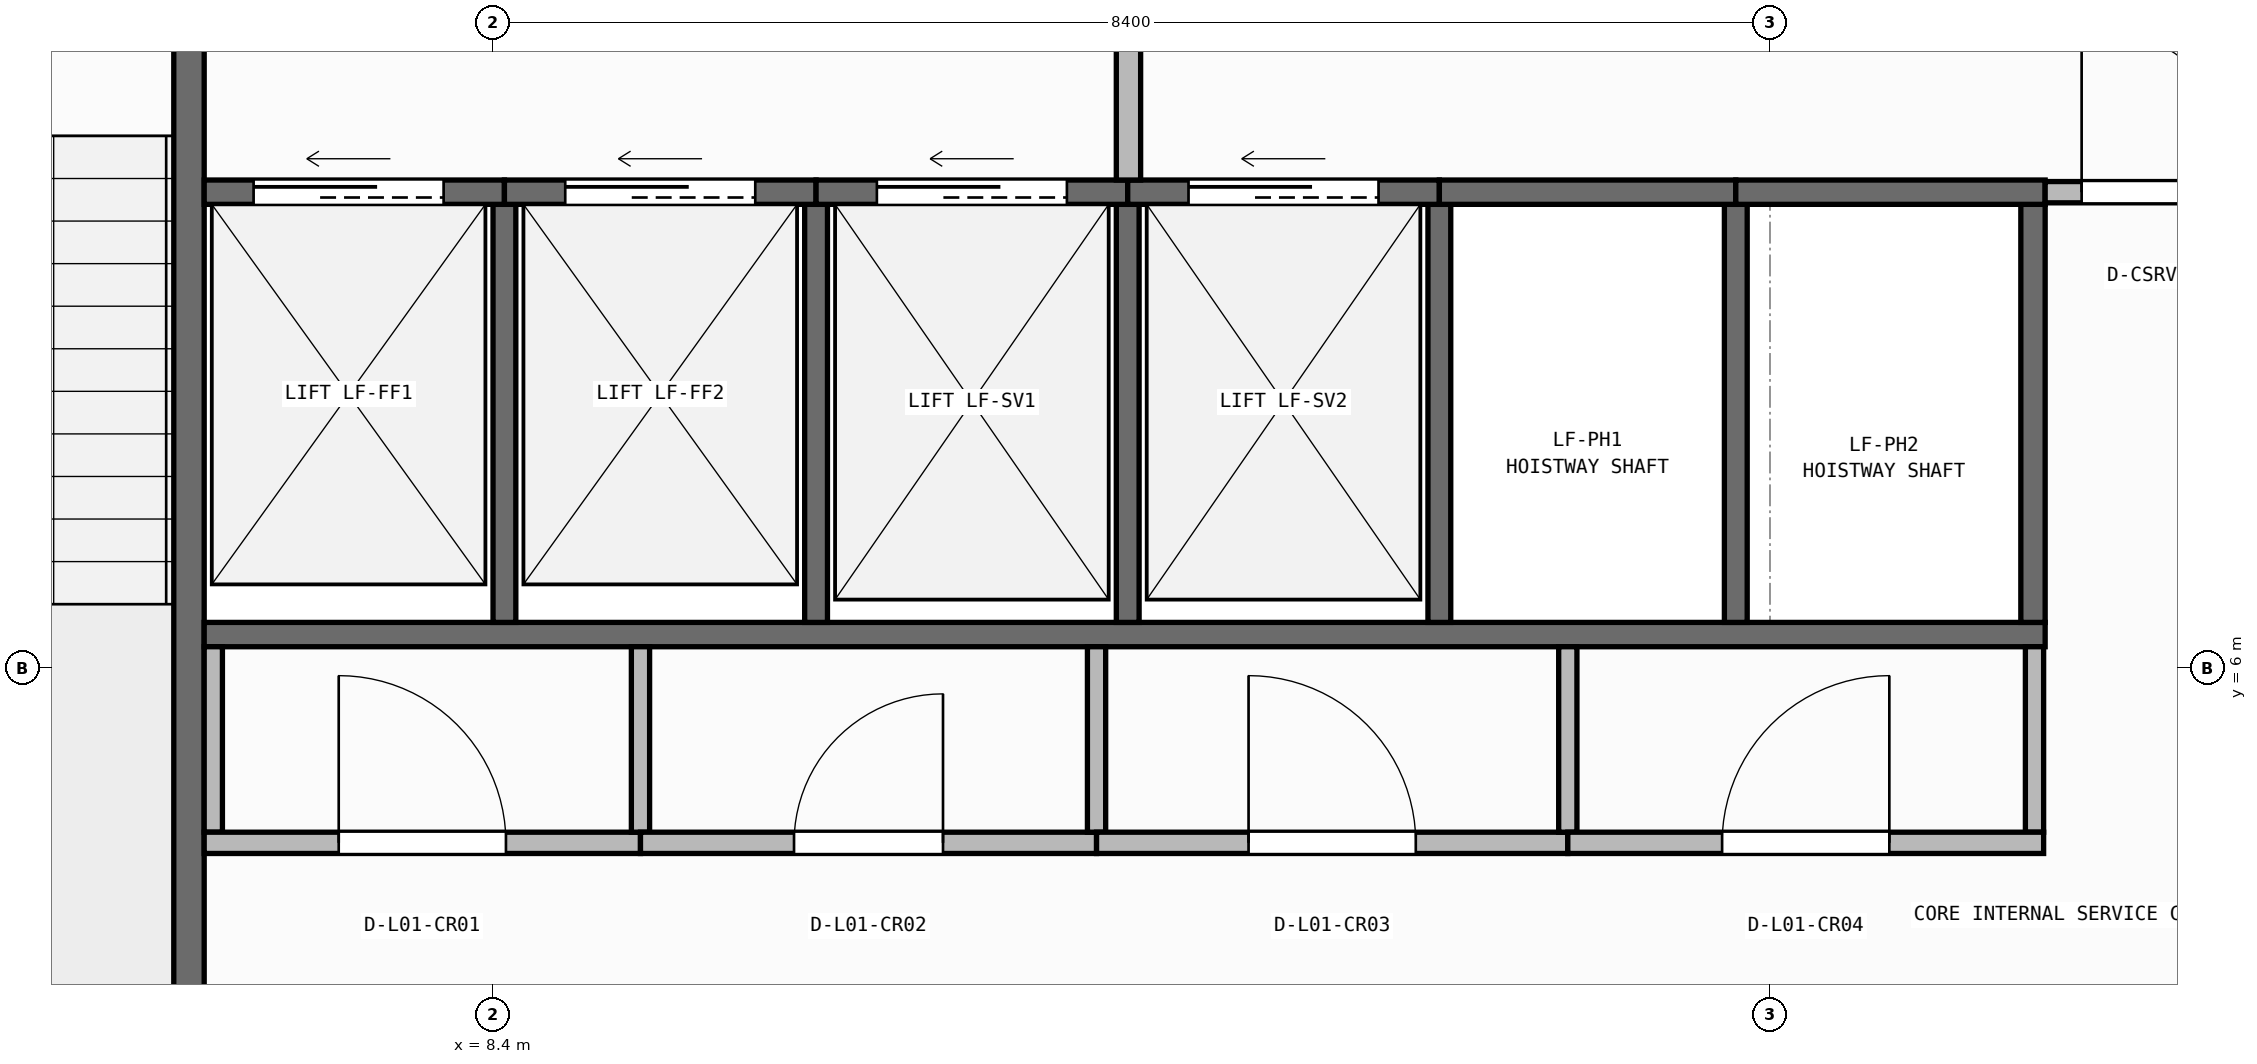
"""IFC4 building model, lengths in metres.
Left out: names, types, materials, properties, quantities, classifications, styles, units other than length and angle.
Written with IfcOpenShell. Run it as: python <this file> out.ifc"""

import sys

from ifc_helpers import new_model, si_unit, direction, frame, frame_2d, origin, place, context, subcontext, project, spatial, rectangle, extrude, element, fill, save


model = new_model("IFC4")
c1 = context("Model", 3, precision=1e-05, world=origin(), true_north=direction((0.0, 1.0)))
c2 = subcontext(c1, "Body", "Model", "MODEL_VIEW")
j1 = project(units=[si_unit("LENGTHUNIT", "METRE"), si_unit("PLANEANGLEUNIT", "RADIAN")], contexts=[c1])
p1 = place(None, origin())
s1 = spatial("IfcSite", under=j1, at=p1, CompositionType="ELEMENT")
p2 = place(p1, origin())
s2 = spatial("IfcBuilding", under=s1, at=p2, CompositionType="ELEMENT")
p3 = place(p2, frame((0.0, 0.0, 4.5)))
s3 = spatial("IfcBuildingStorey", under=s2, at=p3, CompositionType="ELEMENT", Elevation=4.5)
p4 = place(p3, frame((6.4, 3.5, 0.0), z_axis=(0.0, 0.0, 1.0), x_axis=(0.0, 1.0, 0.0)))
e1 = element("IfcWall", 1, at=p4, inside=s3, PredefinedType="SHEAR", context=c2, shape_type="SweptSolid", body=[
    extrude(rectangle(XDim=7.6, YDim=0.2, at=frame_2d((3.8, 0.0))), origin(), (0.0, 0.0, 1.0), 4.25),
])
p5 = place(p3, frame((6.5, 6.22, 0.0), z_axis=(0.0, 0.0, 1.0), x_axis=(1.0, 0.0, 0.0)))
e2 = element("IfcWall", 2, at=p5, inside=s3, PredefinedType="SHEAR", context=c2, shape_type="SweptSolid", body=[
    extrude(rectangle(XDim=12.11, YDim=0.16, at=frame_2d((6.055, 0.0))), origin(), (0.0, 0.0, 1.0), 4.25),
])
p6 = place(p3, frame((18.53, 6.3, 0.0), z_axis=(0.0, 0.0, 1.0), x_axis=(0.0, 1.0, 0.0)))
e3 = element("IfcWall", 3, at=p6, inside=s3, PredefinedType="SHEAR", context=c2, shape_type="SweptSolid", body=[
    extrude(rectangle(XDim=2.75, YDim=0.16, at=frame_2d((1.375, 0.0))), origin(), (0.0, 0.0, 1.0), 4.25),
])
for number, where, z_axis, x_axis in (
    (4, (8.475, 6.3, 0.0), (0.0, 0.0, 1.0), (0.0, 1.0, 0.0)),
    (5, (10.525, 6.3, 0.0), (0.0, 0.0, 1.0), (0.0, 1.0, 0.0)),
    (6, (12.575, 6.3, 0.0), (0.0, 0.0, 1.0), (0.0, 1.0, 0.0)),
    (7, (14.625, 6.3, 0.0), (0.0, 0.0, 1.0), (0.0, 1.0, 0.0)),
    (8, (16.575, 6.3, 0.0), (0.0, 0.0, 1.0), (0.0, 1.0, 0.0)),
):
    element("IfcWall", number, at=place(p3, frame(where, z_axis=z_axis, x_axis=x_axis)), inside=s3, PredefinedType="SHEAR", context=c2, shape_type="SweptSolid", body=[
        extrude(rectangle(XDim=2.75, YDim=0.15, at=frame_2d((1.375, 0.0))), origin(), (0.0, 0.0, 1.0), 4.25),
    ])
p7 = place(p3, frame((6.5, 9.13, 0.0), z_axis=(0.0, 0.0, 1.0), x_axis=(1.0, 0.0, 0.0)))
e9 = element("IfcWall", 9, at=p7, inside=s3, PredefinedType="SHEAR", context=c2, shape_type="SweptSolid", body=[
    extrude(rectangle(XDim=1.975, YDim=0.16, at=frame_2d((0.988, 0.0))), origin(), (0.0, 0.0, 1.0), 4.25),
])
p8 = place(p7, frame((0.325, 0.0, 0.0)))
e10 = element("IfcOpeningElement", 10, at=p8, cuts=e9, PredefinedType="OPENING", context=c2, shape_type="SweptSolid", body=[
    extrude(rectangle(XDim=1.25, YDim=2.15, at=frame_2d((0.625, 1.075))), frame((0.0, 0.09, 0.0), z_axis=(0.0, -1.0, 0.0), x_axis=(1.0, 0.0, 0.0)), (0.0, 0.0, 1.0), 0.18),
])
p9 = place(p3, frame((8.475, 9.13, 0.0), z_axis=(0.0, 0.0, 1.0), x_axis=(1.0, 0.0, 0.0)))
e11 = element("IfcWall", 11, at=p9, inside=s3, PredefinedType="SHEAR", context=c2, shape_type="SweptSolid", body=[
    extrude(rectangle(XDim=2.05, YDim=0.16, at=frame_2d((1.025, 0.0))), origin(), (0.0, 0.0, 1.0), 4.25),
])
p10 = place(p9, frame((0.4, 0.0, 0.0)))
e12 = element("IfcOpeningElement", 12, at=p10, cuts=e11, PredefinedType="OPENING", context=c2, shape_type="SweptSolid", body=[
    extrude(rectangle(XDim=1.25, YDim=2.15, at=frame_2d((0.625, 1.075))), frame((0.0, 0.09, 0.0), z_axis=(0.0, -1.0, 0.0), x_axis=(1.0, 0.0, 0.0)), (0.0, 0.0, 1.0), 0.18),
])
p11 = place(p3, frame((10.525, 9.13, 0.0), z_axis=(0.0, 0.0, 1.0), x_axis=(1.0, 0.0, 0.0)))
e13 = element("IfcWall", 13, at=p11, inside=s3, PredefinedType="SHEAR", context=c2, shape_type="SweptSolid", body=[
    extrude(rectangle(XDim=2.05, YDim=0.16, at=frame_2d((1.025, 0.0))), origin(), (0.0, 0.0, 1.0), 4.25),
])
p12 = place(p11, frame((0.4, 0.0, 0.0)))
e14 = element("IfcOpeningElement", 14, at=p12, cuts=e13, PredefinedType="OPENING", context=c2, shape_type="SweptSolid", body=[
    extrude(rectangle(XDim=1.25, YDim=2.15, at=frame_2d((0.625, 1.075))), frame((0.0, 0.09, 0.0), z_axis=(0.0, -1.0, 0.0), x_axis=(1.0, 0.0, 0.0)), (0.0, 0.0, 1.0), 0.18),
])
p13 = place(p3, frame((12.575, 9.13, 0.0), z_axis=(0.0, 0.0, 1.0), x_axis=(1.0, 0.0, 0.0)))
e15 = element("IfcWall", 15, at=p13, inside=s3, PredefinedType="SHEAR", context=c2, shape_type="SweptSolid", body=[
    extrude(rectangle(XDim=2.05, YDim=0.16, at=frame_2d((1.025, 0.0))), origin(), (0.0, 0.0, 1.0), 4.25),
])
p14 = place(p13, frame((0.4, 0.0, 0.0)))
e16 = element("IfcOpeningElement", 16, at=p14, cuts=e15, PredefinedType="OPENING", context=c2, shape_type="SweptSolid", body=[
    extrude(rectangle(XDim=1.25, YDim=2.15, at=frame_2d((0.625, 1.075))), frame((0.0, 0.09, 0.0), z_axis=(0.0, -1.0, 0.0), x_axis=(1.0, 0.0, 0.0)), (0.0, 0.0, 1.0), 0.18),
])
p15 = place(p3, frame((14.625, 9.13, 0.0), z_axis=(0.0, 0.0, 1.0), x_axis=(1.0, 0.0, 0.0)))
e17 = element("IfcWall", 17, at=p15, inside=s3, PredefinedType="SHEAR", context=c2, shape_type="SweptSolid", body=[
    extrude(rectangle(XDim=1.95, YDim=0.16, at=frame_2d((0.975, 0.0))), origin(), (0.0, 0.0, 1.0), 4.25),
])
p16 = place(p3, frame((16.575, 9.13, 0.0), z_axis=(0.0, 0.0, 1.0), x_axis=(1.0, 0.0, 0.0)))
e18 = element("IfcWall", 18, at=p16, inside=s3, PredefinedType="SHEAR", context=c2, shape_type="SweptSolid", body=[
    extrude(rectangle(XDim=2.035, YDim=0.16, at=frame_2d((1.018, 0.0))), origin(), (0.0, 0.0, 1.0), 4.25),
])
for number, where, z_axis, x_axis in (
    (19, (6.56, 4.92, 0.0), (0.0, 0.0, 1.0), (0.0, 1.0, 0.0)),
    (20, (18.54, 4.92, 0.0), (0.0, 0.0, 1.0), (0.0, 1.0, 0.0)),
):
    element("IfcWall", number, at=place(p3, frame(where, z_axis=z_axis, x_axis=x_axis)), inside=s3, PredefinedType="PARTITIONING", context=c2, shape_type="SweptSolid", body=[
        extrude(rectangle(XDim=1.22, YDim=0.12, at=frame_2d((0.61, 0.0))), origin(), (0.0, 0.0, 1.0), 4.25),
    ])
p17 = place(p3, frame((6.5, 4.85, 0.0), z_axis=(0.0, 0.0, 1.0), x_axis=(1.0, 0.0, 0.0)))
e21 = element("IfcWall", 21, at=p17, inside=s3, PredefinedType="PARTITIONING", context=c2, shape_type="SweptSolid", body=[
    extrude(rectangle(XDim=2.87, YDim=0.14, at=frame_2d((1.435, 0.0))), origin(), (0.0, 0.0, 1.0), 4.25),
])
p18 = place(p17, frame((0.885, 0.0, 0.0)))
e22 = element("IfcOpeningElement", 22, at=p18, cuts=e21, PredefinedType="OPENING", context=c2, shape_type="SweptSolid", body=[
    extrude(rectangle(XDim=1.1, YDim=2.1, at=frame_2d((0.55, 1.05))), frame((0.0, 0.08, 0.0), z_axis=(0.0, -1.0, 0.0), x_axis=(1.0, 0.0, 0.0)), (0.0, 0.0, 1.0), 0.16),
])
p19 = place(p3, frame((9.37, 4.92, 0.0), z_axis=(0.0, 0.0, 1.0), x_axis=(0.0, 1.0, 0.0)))
e23 = element("IfcWall", 23, at=p19, inside=s3, PredefinedType="PARTITIONING", context=c2, shape_type="SweptSolid", body=[
    extrude(rectangle(XDim=1.22, YDim=0.12, at=frame_2d((0.61, 0.0))), origin(), (0.0, 0.0, 1.0), 4.25),
])
p20 = place(p3, frame((9.37, 4.85, 0.0), z_axis=(0.0, 0.0, 1.0), x_axis=(1.0, 0.0, 0.0)))
e24 = element("IfcWall", 24, at=p20, inside=s3, PredefinedType="PARTITIONING", context=c2, shape_type="SweptSolid", body=[
    extrude(rectangle(XDim=3.0, YDim=0.14, at=frame_2d((1.5, 0.0))), origin(), (0.0, 0.0, 1.0), 4.25),
])
p21 = place(p20, frame((1.01, 0.0, 0.0)))
e25 = element("IfcOpeningElement", 25, at=p21, cuts=e24, PredefinedType="OPENING", context=c2, shape_type="SweptSolid", body=[
    extrude(rectangle(XDim=0.98, YDim=2.1, at=frame_2d((0.49, 1.05))), frame((0.0, 0.08, 0.0), z_axis=(0.0, -1.0, 0.0), x_axis=(1.0, 0.0, 0.0)), (0.0, 0.0, 1.0), 0.16),
])
p22 = place(p3, frame((12.37, 4.92, 0.0), z_axis=(0.0, 0.0, 1.0), x_axis=(0.0, 1.0, 0.0)))
e26 = element("IfcWall", 26, at=p22, inside=s3, PredefinedType="PARTITIONING", context=c2, shape_type="SweptSolid", body=[
    extrude(rectangle(XDim=1.22, YDim=0.12, at=frame_2d((0.61, 0.0))), origin(), (0.0, 0.0, 1.0), 4.25),
])
p23 = place(p3, frame((12.37, 4.85, 0.0), z_axis=(0.0, 0.0, 1.0), x_axis=(1.0, 0.0, 0.0)))
e27 = element("IfcWall", 27, at=p23, inside=s3, PredefinedType="PARTITIONING", context=c2, shape_type="SweptSolid", body=[
    extrude(rectangle(XDim=3.1, YDim=0.14, at=frame_2d((1.55, 0.0))), origin(), (0.0, 0.0, 1.0), 4.25),
])
p24 = place(p23, frame((1.0, 0.0, 0.0)))
e28 = element("IfcOpeningElement", 28, at=p24, cuts=e27, PredefinedType="OPENING", context=c2, shape_type="SweptSolid", body=[
    extrude(rectangle(XDim=1.1, YDim=2.1, at=frame_2d((0.55, 1.05))), frame((0.0, 0.08, 0.0), z_axis=(0.0, -1.0, 0.0), x_axis=(1.0, 0.0, 0.0)), (0.0, 0.0, 1.0), 0.16),
])
p25 = place(p3, frame((15.47, 4.92, 0.0), z_axis=(0.0, 0.0, 1.0), x_axis=(0.0, 1.0, 0.0)))
e29 = element("IfcWall", 29, at=p25, inside=s3, PredefinedType="PARTITIONING", context=c2, shape_type="SweptSolid", body=[
    extrude(rectangle(XDim=1.22, YDim=0.12, at=frame_2d((0.61, 0.0))), origin(), (0.0, 0.0, 1.0), 4.25),
])
p26 = place(p3, frame((15.47, 4.85, 0.0), z_axis=(0.0, 0.0, 1.0), x_axis=(1.0, 0.0, 0.0)))
e30 = element("IfcWall", 30, at=p26, inside=s3, PredefinedType="PARTITIONING", context=c2, shape_type="SweptSolid", body=[
    extrude(rectangle(XDim=3.13, YDim=0.14, at=frame_2d((1.565, 0.0))), origin(), (0.0, 0.0, 1.0), 4.25),
])
p27 = place(p26, frame((1.015, 0.0, 0.0)))
e31 = element("IfcOpeningElement", 31, at=p27, cuts=e30, PredefinedType="OPENING", context=c2, shape_type="SweptSolid", body=[
    extrude(rectangle(XDim=1.1, YDim=2.1, at=frame_2d((0.55, 1.05))), frame((0.0, 0.08, 0.0), z_axis=(0.0, -1.0, 0.0), x_axis=(1.0, 0.0, 0.0)), (0.0, 0.0, 1.0), 0.16),
])
p28 = place(p3, frame((18.61, 9.13, 0.0), z_axis=(0.0, 0.0, 1.0), x_axis=(1.0, 0.0, 0.0)))
e32 = element("IfcWall", 32, at=p28, inside=s3, PredefinedType="PARTITIONING", context=c2, shape_type="SweptSolid", body=[
    extrude(rectangle(XDim=1.59, YDim=0.14, at=frame_2d((0.795, 0.0))), origin(), (0.0, 0.0, 1.0), 4.25),
])
p29 = place(p28, frame((0.24, 0.0, 0.0)))
e33 = element("IfcOpeningElement", 33, at=p29, cuts=e32, PredefinedType="OPENING", context=c2, shape_type="SweptSolid", body=[
    extrude(rectangle(XDim=1.1, YDim=2.1, at=frame_2d((0.55, 1.05))), frame((0.0, 0.08, 0.0), z_axis=(0.0, -1.0, 0.0), x_axis=(1.0, 0.0, 0.0)), (0.0, 0.0, 1.0), 0.16),
])
p30 = place(p3, frame((12.58, 9.21, 0.0), z_axis=(0.0, 0.0, 1.0), x_axis=(0.0, 1.0, 0.0)))
e34 = element("IfcWall", 34, at=p30, inside=s3, PredefinedType="PARTITIONING", context=c2, shape_type="SweptSolid", body=[
    extrude(rectangle(XDim=2.79, YDim=0.16, at=frame_2d((1.395, 0.0))), origin(), (0.0, 0.0, 1.0), 4.25),
])
p31 = place(p8, origin())
e35 = element("IfcDoor", 35, at=p31, inside=s3, OperationType="SLIDING_TO_LEFT", PredefinedType="DOOR", context=c2, shape_type="SweptSolid", body=[
    extrude(rectangle(XDim=1.25, YDim=2.15, at=frame_2d((0.625, 1.075))), frame((0.0, 0.025, 0.0), z_axis=(0.0, -1.0, 0.0), x_axis=(1.0, 0.0, 0.0)), (0.0, 0.0, 1.0), 0.05),
])
fill(e10, e35)
p32 = place(p10, origin())
e36 = element("IfcDoor", 36, at=p32, inside=s3, OperationType="SLIDING_TO_LEFT", PredefinedType="DOOR", context=c2, shape_type="SweptSolid", body=[
    extrude(rectangle(XDim=1.25, YDim=2.15, at=frame_2d((0.625, 1.075))), frame((0.0, 0.025, 0.0), z_axis=(0.0, -1.0, 0.0), x_axis=(1.0, 0.0, 0.0)), (0.0, 0.0, 1.0), 0.05),
])
fill(e12, e36)
p33 = place(p12, origin())
e37 = element("IfcDoor", 37, at=p33, inside=s3, OperationType="SLIDING_TO_LEFT", PredefinedType="DOOR", context=c2, shape_type="SweptSolid", body=[
    extrude(rectangle(XDim=1.25, YDim=2.15, at=frame_2d((0.625, 1.075))), frame((0.0, 0.025, 0.0), z_axis=(0.0, -1.0, 0.0), x_axis=(1.0, 0.0, 0.0)), (0.0, 0.0, 1.0), 0.05),
])
fill(e14, e37)
p34 = place(p14, origin())
e38 = element("IfcDoor", 38, at=p34, inside=s3, OperationType="SLIDING_TO_LEFT", PredefinedType="DOOR", context=c2, shape_type="SweptSolid", body=[
    extrude(rectangle(XDim=1.25, YDim=2.15, at=frame_2d((0.625, 1.075))), frame((0.0, 0.025, 0.0), z_axis=(0.0, -1.0, 0.0), x_axis=(1.0, 0.0, 0.0)), (0.0, 0.0, 1.0), 0.05),
])
fill(e16, e38)
p35 = place(p18, origin())
e39 = element("IfcDoor", 39, at=p35, inside=s3, OperationType="SINGLE_SWING_LEFT", PredefinedType="DOOR", context=c2, shape_type="SweptSolid", body=[
    extrude(rectangle(XDim=1.1, YDim=2.1, at=frame_2d((0.55, 1.05))), frame((0.0, 0.025, 0.0), z_axis=(0.0, -1.0, 0.0), x_axis=(1.0, 0.0, 0.0)), (0.0, 0.0, 1.0), 0.05),
])
fill(e22, e39)
p36 = place(p21, origin())
e40 = element("IfcDoor", 40, at=p36, inside=s3, OperationType="SINGLE_SWING_RIGHT", PredefinedType="DOOR", context=c2, shape_type="SweptSolid", body=[
    extrude(rectangle(XDim=0.98, YDim=2.1, at=frame_2d((0.49, 1.05))), frame((0.0, 0.025, 0.0), z_axis=(0.0, -1.0, 0.0), x_axis=(1.0, 0.0, 0.0)), (0.0, 0.0, 1.0), 0.05),
])
fill(e25, e40)
p37 = place(p24, origin())
e41 = element("IfcDoor", 41, at=p37, inside=s3, OperationType="SINGLE_SWING_LEFT", PredefinedType="DOOR", context=c2, shape_type="SweptSolid", body=[
    extrude(rectangle(XDim=1.1, YDim=2.1, at=frame_2d((0.55, 1.05))), frame((0.0, 0.025, 0.0), z_axis=(0.0, -1.0, 0.0), x_axis=(1.0, 0.0, 0.0)), (0.0, 0.0, 1.0), 0.05),
])
fill(e28, e41)
p38 = place(p27, origin())
e42 = element("IfcDoor", 42, at=p38, inside=s3, OperationType="SINGLE_SWING_RIGHT", PredefinedType="DOOR", context=c2, shape_type="SweptSolid", body=[
    extrude(rectangle(XDim=1.1, YDim=2.1, at=frame_2d((0.55, 1.05))), frame((0.0, 0.025, 0.0), z_axis=(0.0, -1.0, 0.0), x_axis=(1.0, 0.0, 0.0)), (0.0, 0.0, 1.0), 0.05),
])
fill(e31, e42)
p39 = place(p29, origin())
e43 = element("IfcDoor", 43, at=p39, inside=s3, OperationType="SINGLE_SWING_LEFT", PredefinedType="DOOR", context=c2, shape_type="SweptSolid", body=[
    extrude(rectangle(XDim=1.1, YDim=2.1, at=frame_2d((0.55, 1.05))), frame((0.0, 0.025, 0.0), z_axis=(0.0, -1.0, 0.0), x_axis=(1.0, 0.0, 0.0)), (0.0, 0.0, 1.0), 0.05),
])
fill(e33, e43)
save(model, sys.argv[1])
